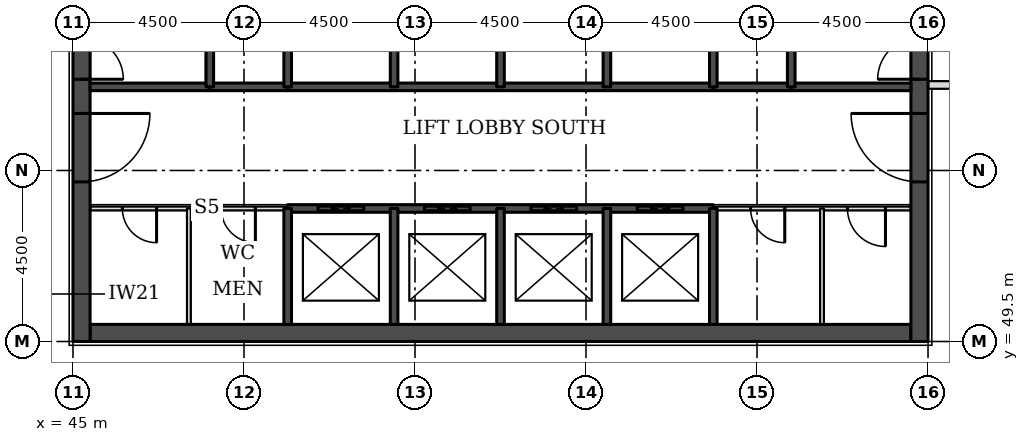
"""IFC4 building model, lengths in metres.
Left out: names, types, materials, properties, quantities, classifications, styles, units other than length and angle.
Written with IfcOpenShell. Run it as: python <this file> out.ifc"""

import sys

from ifc_helpers import new_model, si_unit, direction, frame, frame_2d, origin, place, context, subcontext, project, spatial, rectangle, extrude, element, fill, save


model = new_model("IFC4")
c1 = context("Model", 3, precision=1e-05, world=origin(), true_north=direction((0.0, 1.0)))
c2 = subcontext(c1, "Body", "Model", "MODEL_VIEW")
j1 = project(units=[si_unit("LENGTHUNIT", "METRE"), si_unit("PLANEANGLEUNIT", "RADIAN")], contexts=[c1])
p1 = place(None, origin())
s1 = spatial("IfcSite", under=j1, at=p1, CompositionType="ELEMENT")
p2 = place(p1, origin())
s2 = spatial("IfcBuilding", under=s1, at=p2, CompositionType="ELEMENT")
p3 = place(p2, frame((0.0, 0.0, 138.1)))
s3 = spatial("IfcBuildingStorey", under=s2, at=p3, CompositionType="ELEMENT", Elevation=138.1)
p4 = place(p3, frame((45.45, 49.725, 0.0), z_axis=(0.0, 0.0, 1.0), x_axis=(1.0, 0.0, 0.0)))
e1 = element("IfcWall", 1, at=p4, inside=s3, PredefinedType="SHEAR", context=c2, shape_type="SweptSolid", body=[
    extrude(rectangle(XDim=21.6, YDim=0.45, at=frame_2d((10.8, 0.0))), origin(), (0.0, 0.0, 1.0), 5.0),
])
p5 = place(p3, frame((45.225, 49.5, 0.0), z_axis=(0.0, 0.0, 1.0), x_axis=(0.0, 1.0, 0.0)))
e2 = element("IfcWall", 2, at=p5, inside=s3, PredefinedType="SHEAR", context=c2, shape_type="SweptSolid", body=[
    extrude(rectangle(XDim=22.5, YDim=0.45, at=frame_2d((11.25, 0.0))), origin(), (0.0, 0.0, 1.0), 5.0),
])
p6 = place(p5, frame((4.2, 0.0, 0.0)))
e3 = element("IfcOpeningElement", 3, at=p6, cuts=e2, PredefinedType="OPENING", context=c2, shape_type="SweptSolid", body=[
    extrude(rectangle(XDim=1.8, YDim=2.1, at=frame_2d((0.9, 1.05))), frame((0.0, 0.235, 0.0), z_axis=(0.0, -1.0, 0.0), x_axis=(1.0, 0.0, 0.0)), (0.0, 0.0, 1.0), 0.47),
])
p7 = place(p5, frame((6.9, 0.0, 0.0)))
e4 = element("IfcOpeningElement", 4, at=p7, cuts=e2, PredefinedType="OPENING", context=c2, shape_type="SweptSolid", body=[
    extrude(rectangle(XDim=1.1, YDim=2.1, at=frame_2d((0.55, 1.05))), frame((0.0, 0.235, 0.0), z_axis=(0.0, -1.0, 0.0), x_axis=(1.0, 0.0, 0.0)), (0.0, 0.0, 1.0), 0.47),
])
p8 = place(p5, frame((13.6, 0.0, 0.0)))
e5 = element("IfcOpeningElement", 5, at=p8, cuts=e2, PredefinedType="OPENING", context=c2, shape_type="SweptSolid", body=[
    extrude(rectangle(XDim=1.1, YDim=2.1, at=frame_2d((0.55, 1.05))), frame((0.0, 0.235, 0.0), z_axis=(0.0, -1.0, 0.0), x_axis=(1.0, 0.0, 0.0)), (0.0, 0.0, 1.0), 0.47),
])
p9 = place(p5, frame((16.5, 0.0, 0.0)))
e6 = element("IfcOpeningElement", 6, at=p9, cuts=e2, PredefinedType="OPENING", context=c2, shape_type="SweptSolid", body=[
    extrude(rectangle(XDim=1.8, YDim=2.1, at=frame_2d((0.9, 1.05))), frame((0.0, 0.235, 0.0), z_axis=(0.0, -1.0, 0.0), x_axis=(1.0, 0.0, 0.0)), (0.0, 0.0, 1.0), 0.47),
])
p10 = place(p3, frame((67.275, 49.5, 0.0), z_axis=(0.0, 0.0, 1.0), x_axis=(0.0, 1.0, 0.0)))
e7 = element("IfcWall", 7, at=p10, inside=s3, PredefinedType="SHEAR", context=c2, shape_type="SweptSolid", body=[
    extrude(rectangle(XDim=22.5, YDim=0.45, at=frame_2d((11.25, 0.0))), origin(), (0.0, 0.0, 1.0), 5.0),
])
p11 = place(p10, frame((4.2, 0.0, 0.0)))
e8 = element("IfcOpeningElement", 8, at=p11, cuts=e7, PredefinedType="OPENING", context=c2, shape_type="SweptSolid", body=[
    extrude(rectangle(XDim=1.8, YDim=2.1, at=frame_2d((0.9, 1.05))), frame((0.0, 0.235, 0.0), z_axis=(0.0, -1.0, 0.0), x_axis=(1.0, 0.0, 0.0)), (0.0, 0.0, 1.0), 0.47),
])
p12 = place(p10, frame((6.9, 0.0, 0.0)))
e9 = element("IfcOpeningElement", 9, at=p12, cuts=e7, PredefinedType="OPENING", context=c2, shape_type="SweptSolid", body=[
    extrude(rectangle(XDim=1.1, YDim=2.1, at=frame_2d((0.55, 1.05))), frame((0.0, 0.235, 0.0), z_axis=(0.0, -1.0, 0.0), x_axis=(1.0, 0.0, 0.0)), (0.0, 0.0, 1.0), 0.47),
])
p13 = place(p10, frame((13.6, 0.0, 0.0)))
e10 = element("IfcOpeningElement", 10, at=p13, cuts=e7, PredefinedType="OPENING", context=c2, shape_type="SweptSolid", body=[
    extrude(rectangle(XDim=1.1, YDim=2.1, at=frame_2d((0.55, 1.05))), frame((0.0, 0.235, 0.0), z_axis=(0.0, -1.0, 0.0), x_axis=(1.0, 0.0, 0.0)), (0.0, 0.0, 1.0), 0.47),
])
p14 = place(p10, frame((16.5, 0.0, 0.0)))
e11 = element("IfcOpeningElement", 11, at=p14, cuts=e7, PredefinedType="OPENING", context=c2, shape_type="SweptSolid", body=[
    extrude(rectangle(XDim=1.8, YDim=2.1, at=frame_2d((0.9, 1.05))), frame((0.0, 0.235, 0.0), z_axis=(0.0, -1.0, 0.0), x_axis=(1.0, 0.0, 0.0)), (0.0, 0.0, 1.0), 0.47),
])
p15 = place(p3, frame((67.5, 56.25, 0.0), z_axis=(0.0, 0.0, 1.0), x_axis=(1.0, 0.0, 0.0)))
e12 = element("IfcWall", 12, at=p15, inside=s3, PredefinedType="PARTITIONING", context=c2, shape_type="SweptSolid", body=[
    extrude(rectangle(XDim=2.0, YDim=0.2, at=frame_2d((1.0, 0.0))), origin(), (0.0, 0.0, 1.0), 4.85),
])
p16 = place(p3, frame((45.45, 53.0, 0.0), z_axis=(0.0, 0.0, 1.0), x_axis=(1.0, 0.0, 0.0)))
e13 = element("IfcWall", 13, at=p16, inside=s3, PredefinedType="PARTITIONING", context=c2, shape_type="SweptSolid", body=[
    extrude(rectangle(XDim=5.2, YDim=0.1, at=frame_2d((2.6, 0.0))), origin(), (0.0, 0.0, 1.0), 4.85),
])
p17 = place(p16, frame((0.85, 0.0, 0.0)))
e14 = element("IfcOpeningElement", 14, at=p17, cuts=e13, PredefinedType="OPENING", context=c2, shape_type="SweptSolid", body=[
    extrude(rectangle(XDim=0.9, YDim=2.1, at=frame_2d((0.45, 1.05))), frame((0.0, 0.06, 0.0), z_axis=(0.0, -1.0, 0.0), x_axis=(1.0, 0.0, 0.0)), (0.0, 0.0, 1.0), 0.12),
])
p18 = place(p16, frame((3.45, 0.0, 0.0)))
e15 = element("IfcOpeningElement", 15, at=p18, cuts=e13, PredefinedType="OPENING", context=c2, shape_type="SweptSolid", body=[
    extrude(rectangle(XDim=0.9, YDim=2.1, at=frame_2d((0.45, 1.05))), frame((0.0, 0.06, 0.0), z_axis=(0.0, -1.0, 0.0), x_axis=(1.0, 0.0, 0.0)), (0.0, 0.0, 1.0), 0.12),
])
p19 = place(p3, frame((61.85, 53.0, 0.0), z_axis=(0.0, 0.0, 1.0), x_axis=(1.0, 0.0, 0.0)))
e16 = element("IfcWall", 16, at=p19, inside=s3, PredefinedType="PARTITIONING", context=c2, shape_type="SweptSolid", body=[
    extrude(rectangle(XDim=5.2, YDim=0.1, at=frame_2d((2.6, 0.0))), origin(), (0.0, 0.0, 1.0), 4.85),
])
p20 = place(p19, frame((3.53, 0.0, 0.0)))
e17 = element("IfcOpeningElement", 17, at=p20, cuts=e16, PredefinedType="OPENING", context=c2, shape_type="SweptSolid", body=[
    extrude(rectangle(XDim=1.0, YDim=2.1, at=frame_2d((0.5, 1.05))), frame((0.0, 0.06, 0.0), z_axis=(0.0, -1.0, 0.0), x_axis=(1.0, 0.0, 0.0)), (0.0, 0.0, 1.0), 0.12),
])
p21 = place(p19, frame((0.98, 0.0, 0.0)))
e18 = element("IfcOpeningElement", 18, at=p21, cuts=e16, PredefinedType="OPENING", context=c2, shape_type="SweptSolid", body=[
    extrude(rectangle(XDim=0.9, YDim=2.1, at=frame_2d((0.45, 1.05))), frame((0.0, 0.06, 0.0), z_axis=(0.0, -1.0, 0.0), x_axis=(1.0, 0.0, 0.0)), (0.0, 0.0, 1.0), 0.12),
])
p22 = place(p3, frame((50.65, 53.0, 0.0), z_axis=(0.0, 0.0, 1.0), x_axis=(1.0, 0.0, 0.0)))
e19 = element("IfcWall", 19, at=p22, inside=s3, PredefinedType="SOLIDWALL", context=c2, shape_type="SweptSolid", body=[
    extrude(rectangle(XDim=11.2, YDim=0.2, at=frame_2d((5.6, 0.0))), origin(), (0.0, 0.0, 1.0), 4.85),
])
p23 = place(p22, frame((0.8, 0.0, 0.0)))
e20 = element("IfcOpeningElement", 20, at=p23, cuts=e19, PredefinedType="OPENING", context=c2, shape_type="SweptSolid", body=[
    extrude(rectangle(XDim=1.2, YDim=2.1, at=frame_2d((0.6, 1.05))), frame((0.0, 0.11, 0.0), z_axis=(0.0, -1.0, 0.0), x_axis=(1.0, 0.0, 0.0)), (0.0, 0.0, 1.0), 0.22),
])
p24 = place(p22, frame((3.6, 0.0, 0.0)))
e21 = element("IfcOpeningElement", 21, at=p24, cuts=e19, PredefinedType="OPENING", context=c2, shape_type="SweptSolid", body=[
    extrude(rectangle(XDim=1.2, YDim=2.1, at=frame_2d((0.6, 1.05))), frame((0.0, 0.11, 0.0), z_axis=(0.0, -1.0, 0.0), x_axis=(1.0, 0.0, 0.0)), (0.0, 0.0, 1.0), 0.22),
])
p25 = place(p22, frame((6.4, 0.0, 0.0)))
e22 = element("IfcOpeningElement", 22, at=p25, cuts=e19, PredefinedType="OPENING", context=c2, shape_type="SweptSolid", body=[
    extrude(rectangle(XDim=1.2, YDim=2.1, at=frame_2d((0.6, 1.05))), frame((0.0, 0.11, 0.0), z_axis=(0.0, -1.0, 0.0), x_axis=(1.0, 0.0, 0.0)), (0.0, 0.0, 1.0), 0.22),
])
p26 = place(p22, frame((9.2, 0.0, 0.0)))
e23 = element("IfcOpeningElement", 23, at=p26, cuts=e19, PredefinedType="OPENING", context=c2, shape_type="SweptSolid", body=[
    extrude(rectangle(XDim=1.2, YDim=2.1, at=frame_2d((0.6, 1.05))), frame((0.0, 0.11, 0.0), z_axis=(0.0, -1.0, 0.0), x_axis=(1.0, 0.0, 0.0)), (0.0, 0.0, 1.0), 0.22),
])
for number, where, z_axis, x_axis in (
    (24, (48.6, 56.2, 0.0), (0.0, 0.0, 1.0), (1.0, 0.0, 0.0)),
    (25, (61.85, 56.2, 0.0), (0.0, 0.0, 1.0), (1.0, 0.0, 0.0)),
):
    element("IfcWall", number, at=place(p3, frame(where, z_axis=z_axis, x_axis=x_axis)), inside=s3, PredefinedType="SOLIDWALL", context=c2, shape_type="SweptSolid", body=[
        extrude(rectangle(XDim=2.05, YDim=0.2, at=frame_2d((1.025, 0.0))), origin(), (0.0, 0.0, 1.0), 4.85),
    ])
p27 = place(p3, frame((45.45, 56.2, 0.0), z_axis=(0.0, 0.0, 1.0), x_axis=(1.0, 0.0, 0.0)))
e26 = element("IfcWall", 26, at=p27, inside=s3, PredefinedType="SOLIDWALL", context=c2, shape_type="SweptSolid", body=[
    extrude(rectangle(XDim=3.15, YDim=0.2, at=frame_2d((1.575, 0.0))), origin(), (0.0, 0.0, 1.0), 4.85),
])
p28 = place(p3, frame((50.65, 56.2, 0.0), z_axis=(0.0, 0.0, 1.0), x_axis=(1.0, 0.0, 0.0)))
e27 = element("IfcWall", 27, at=p28, inside=s3, PredefinedType="SOLIDWALL", context=c2, shape_type="SweptSolid", body=[
    extrude(rectangle(XDim=11.2, YDim=0.2, at=frame_2d((5.6, 0.0))), origin(), (0.0, 0.0, 1.0), 4.85),
])
p29 = place(p3, frame((63.9, 56.2, 0.0), z_axis=(0.0, 0.0, 1.0), x_axis=(1.0, 0.0, 0.0)))
e28 = element("IfcWall", 28, at=p29, inside=s3, PredefinedType="SOLIDWALL", context=c2, shape_type="SweptSolid", body=[
    extrude(rectangle(XDim=3.15, YDim=0.2, at=frame_2d((1.575, 0.0))), origin(), (0.0, 0.0, 1.0), 4.85),
])
p30 = place(p3, frame((48.05, 49.95, 0.0), z_axis=(0.0, 0.0, 1.0), x_axis=(0.0, 1.0, 0.0)))
e29 = element("IfcWall", 29, at=p30, inside=s3, PredefinedType="PARTITIONING", context=c2, shape_type="SweptSolid", body=[
    extrude(rectangle(XDim=3.05, YDim=0.1, at=frame_2d((1.525, 0.0))), origin(), (0.0, 0.0, 1.0), 4.85),
])
p31 = place(p3, frame((48.6, 56.2, 0.0), z_axis=(0.0, 0.0, 1.0), x_axis=(0.0, 1.0, 0.0)))
e30 = element("IfcWall", 30, at=p31, inside=s3, PredefinedType="SOLIDWALL", context=c2, shape_type="SweptSolid", body=[
    extrude(rectangle(XDim=5.8, YDim=0.2, at=frame_2d((2.9, 0.0))), origin(), (0.0, 0.0, 1.0), 4.85),
])
p32 = place(p3, frame((50.65, 49.95, 0.0), z_axis=(0.0, 0.0, 1.0), x_axis=(0.0, 1.0, 0.0)))
e31 = element("IfcWall", 31, at=p32, inside=s3, PredefinedType="SOLIDWALL", context=c2, shape_type="SweptSolid", body=[
    extrude(rectangle(XDim=3.05, YDim=0.2, at=frame_2d((1.525, 0.0))), origin(), (0.0, 0.0, 1.0), 4.85),
])
p33 = place(p3, frame((50.65, 56.2, 0.0), z_axis=(0.0, 0.0, 1.0), x_axis=(0.0, 1.0, 0.0)))
e32 = element("IfcWall", 32, at=p33, inside=s3, PredefinedType="SOLIDWALL", context=c2, shape_type="SweptSolid", body=[
    extrude(rectangle(XDim=2.8, YDim=0.2, at=frame_2d((1.4, 0.0))), origin(), (0.0, 0.0, 1.0), 4.85),
])
p34 = place(p3, frame((53.45, 49.95, 0.0), z_axis=(0.0, 0.0, 1.0), x_axis=(0.0, 1.0, 0.0)))
e33 = element("IfcWall", 33, at=p34, inside=s3, PredefinedType="SOLIDWALL", context=c2, shape_type="SweptSolid", body=[
    extrude(rectangle(XDim=3.05, YDim=0.2, at=frame_2d((1.525, 0.0))), origin(), (0.0, 0.0, 1.0), 4.85),
])
p35 = place(p3, frame((53.45, 56.2, 0.0), z_axis=(0.0, 0.0, 1.0), x_axis=(0.0, 1.0, 0.0)))
e34 = element("IfcWall", 34, at=p35, inside=s3, PredefinedType="SOLIDWALL", context=c2, shape_type="SweptSolid", body=[
    extrude(rectangle(XDim=2.8, YDim=0.2, at=frame_2d((1.4, 0.0))), origin(), (0.0, 0.0, 1.0), 4.85),
])
p36 = place(p3, frame((56.25, 49.95, 0.0), z_axis=(0.0, 0.0, 1.0), x_axis=(0.0, 1.0, 0.0)))
e35 = element("IfcWall", 35, at=p36, inside=s3, PredefinedType="SOLIDWALL", context=c2, shape_type="SweptSolid", body=[
    extrude(rectangle(XDim=3.05, YDim=0.2, at=frame_2d((1.525, 0.0))), origin(), (0.0, 0.0, 1.0), 4.85),
])
p37 = place(p3, frame((56.25, 56.2, 0.0), z_axis=(0.0, 0.0, 1.0), x_axis=(0.0, 1.0, 0.0)))
e36 = element("IfcWall", 36, at=p37, inside=s3, PredefinedType="SOLIDWALL", context=c2, shape_type="SweptSolid", body=[
    extrude(rectangle(XDim=2.8, YDim=0.2, at=frame_2d((1.4, 0.0))), origin(), (0.0, 0.0, 1.0), 4.85),
])
p38 = place(p3, frame((59.05, 49.95, 0.0), z_axis=(0.0, 0.0, 1.0), x_axis=(0.0, 1.0, 0.0)))
e37 = element("IfcWall", 37, at=p38, inside=s3, PredefinedType="SOLIDWALL", context=c2, shape_type="SweptSolid", body=[
    extrude(rectangle(XDim=3.05, YDim=0.2, at=frame_2d((1.525, 0.0))), origin(), (0.0, 0.0, 1.0), 4.85),
])
p39 = place(p3, frame((59.05, 56.2, 0.0), z_axis=(0.0, 0.0, 1.0), x_axis=(0.0, 1.0, 0.0)))
e38 = element("IfcWall", 38, at=p39, inside=s3, PredefinedType="SOLIDWALL", context=c2, shape_type="SweptSolid", body=[
    extrude(rectangle(XDim=2.8, YDim=0.2, at=frame_2d((1.4, 0.0))), origin(), (0.0, 0.0, 1.0), 4.85),
])
p40 = place(p3, frame((61.85, 49.95, 0.0), z_axis=(0.0, 0.0, 1.0), x_axis=(0.0, 1.0, 0.0)))
e39 = element("IfcWall", 39, at=p40, inside=s3, PredefinedType="SOLIDWALL", context=c2, shape_type="SweptSolid", body=[
    extrude(rectangle(XDim=3.05, YDim=0.2, at=frame_2d((1.525, 0.0))), origin(), (0.0, 0.0, 1.0), 4.85),
])
p41 = place(p3, frame((61.85, 56.2, 0.0), z_axis=(0.0, 0.0, 1.0), x_axis=(0.0, 1.0, 0.0)))
e40 = element("IfcWall", 40, at=p41, inside=s3, PredefinedType="SOLIDWALL", context=c2, shape_type="SweptSolid", body=[
    extrude(rectangle(XDim=2.8, YDim=0.2, at=frame_2d((1.4, 0.0))), origin(), (0.0, 0.0, 1.0), 4.85),
])
p42 = place(p3, frame((63.9, 56.2, 0.0), z_axis=(0.0, 0.0, 1.0), x_axis=(0.0, 1.0, 0.0)))
e41 = element("IfcWall", 41, at=p42, inside=s3, PredefinedType="SOLIDWALL", context=c2, shape_type="SweptSolid", body=[
    extrude(rectangle(XDim=5.8, YDim=0.2, at=frame_2d((2.9, 0.0))), origin(), (0.0, 0.0, 1.0), 4.85),
])
p43 = place(p3, frame((64.71, 49.95, 0.0), z_axis=(0.0, 0.0, 1.0), x_axis=(0.0, 1.0, 0.0)))
e42 = element("IfcWall", 42, at=p43, inside=s3, PredefinedType="PARTITIONING", context=c2, shape_type="SweptSolid", body=[
    extrude(rectangle(XDim=3.05, YDim=0.1, at=frame_2d((1.525, 0.0))), origin(), (0.0, 0.0, 1.0), 4.85),
])
p44 = place(p23, origin())
e43 = element("IfcDoor", 43, at=p44, inside=s3, OperationType="DOUBLE_DOOR_SLIDING", PredefinedType="DOOR", context=c2, shape_type="SweptSolid", body=[
    extrude(rectangle(XDim=1.2, YDim=2.1, at=frame_2d((0.6, 1.05))), frame((0.0, 0.025, 0.0), z_axis=(0.0, -1.0, 0.0), x_axis=(1.0, 0.0, 0.0)), (0.0, 0.0, 1.0), 0.05),
])
fill(e20, e43)
p45 = place(p24, origin())
e44 = element("IfcDoor", 44, at=p45, inside=s3, OperationType="DOUBLE_DOOR_SLIDING", PredefinedType="DOOR", context=c2, shape_type="SweptSolid", body=[
    extrude(rectangle(XDim=1.2, YDim=2.1, at=frame_2d((0.6, 1.05))), frame((0.0, 0.025, 0.0), z_axis=(0.0, -1.0, 0.0), x_axis=(1.0, 0.0, 0.0)), (0.0, 0.0, 1.0), 0.05),
])
fill(e21, e44)
p46 = place(p25, origin())
e45 = element("IfcDoor", 45, at=p46, inside=s3, OperationType="DOUBLE_DOOR_SLIDING", PredefinedType="DOOR", context=c2, shape_type="SweptSolid", body=[
    extrude(rectangle(XDim=1.2, YDim=2.1, at=frame_2d((0.6, 1.05))), frame((0.0, 0.025, 0.0), z_axis=(0.0, -1.0, 0.0), x_axis=(1.0, 0.0, 0.0)), (0.0, 0.0, 1.0), 0.05),
])
fill(e22, e45)
p47 = place(p26, origin())
e46 = element("IfcDoor", 46, at=p47, inside=s3, OperationType="DOUBLE_DOOR_SLIDING", PredefinedType="DOOR", context=c2, shape_type="SweptSolid", body=[
    extrude(rectangle(XDim=1.2, YDim=2.1, at=frame_2d((0.6, 1.05))), frame((0.0, 0.025, 0.0), z_axis=(0.0, -1.0, 0.0), x_axis=(1.0, 0.0, 0.0)), (0.0, 0.0, 1.0), 0.05),
])
fill(e23, e46)
p48 = place(p6, frame((1.8, 0.0, 0.0), z_axis=(0.0, 0.0, 1.0), x_axis=(-1.0, 0.0, 0.0)))
e47 = element("IfcDoor", 47, at=p48, inside=s3, OperationType="SINGLE_SWING_LEFT", PredefinedType="DOOR", context=c2, shape_type="SweptSolid", body=[
    extrude(rectangle(XDim=1.8, YDim=2.1, at=frame_2d((0.9, 1.05))), frame((0.0, 0.025, 0.0), z_axis=(0.0, -1.0, 0.0), x_axis=(1.0, 0.0, 0.0)), (0.0, 0.0, 1.0), 0.05),
])
fill(e3, e47)
p49 = place(p7, frame((1.1, 0.0, 0.0), z_axis=(0.0, 0.0, 1.0), x_axis=(-1.0, 0.0, 0.0)))
e48 = element("IfcDoor", 48, at=p49, inside=s3, OperationType="SINGLE_SWING_RIGHT", PredefinedType="DOOR", context=c2, shape_type="SweptSolid", body=[
    extrude(rectangle(XDim=1.1, YDim=2.1, at=frame_2d((0.55, 1.05))), frame((0.0, 0.025, 0.0), z_axis=(0.0, -1.0, 0.0), x_axis=(1.0, 0.0, 0.0)), (0.0, 0.0, 1.0), 0.05),
])
fill(e4, e48)
p50 = place(p11, origin())
e49 = element("IfcDoor", 49, at=p50, inside=s3, OperationType="SINGLE_SWING_RIGHT", PredefinedType="DOOR", context=c2, shape_type="SweptSolid", body=[
    extrude(rectangle(XDim=1.8, YDim=2.1, at=frame_2d((0.9, 1.05))), frame((0.0, 0.025, 0.0), z_axis=(0.0, -1.0, 0.0), x_axis=(1.0, 0.0, 0.0)), (0.0, 0.0, 1.0), 0.05),
])
fill(e8, e49)
p51 = place(p12, origin())
e50 = element("IfcDoor", 50, at=p51, inside=s3, OperationType="SINGLE_SWING_LEFT", PredefinedType="DOOR", context=c2, shape_type="SweptSolid", body=[
    extrude(rectangle(XDim=1.1, YDim=2.1, at=frame_2d((0.55, 1.05))), frame((0.0, 0.025, 0.0), z_axis=(0.0, -1.0, 0.0), x_axis=(1.0, 0.0, 0.0)), (0.0, 0.0, 1.0), 0.05),
])
fill(e9, e50)
p52 = place(p20, frame((1.0, 0.0, 0.0), z_axis=(0.0, 0.0, 1.0), x_axis=(-1.0, 0.0, 0.0)))
e51 = element("IfcDoor", 51, at=p52, inside=s3, OperationType="SINGLE_SWING_LEFT", PredefinedType="DOOR", context=c2, shape_type="SweptSolid", body=[
    extrude(rectangle(XDim=1.0, YDim=2.1, at=frame_2d((0.5, 1.05))), frame((0.0, 0.025, 0.0), z_axis=(0.0, -1.0, 0.0), x_axis=(1.0, 0.0, 0.0)), (0.0, 0.0, 1.0), 0.05),
])
fill(e17, e51)
p53 = place(p21, frame((0.9, 0.0, 0.0), z_axis=(0.0, 0.0, 1.0), x_axis=(-1.0, 0.0, 0.0)))
e52 = element("IfcDoor", 52, at=p53, inside=s3, OperationType="SINGLE_SWING_LEFT", PredefinedType="DOOR", context=c2, shape_type="SweptSolid", body=[
    extrude(rectangle(XDim=0.9, YDim=2.1, at=frame_2d((0.45, 1.05))), frame((0.0, 0.025, 0.0), z_axis=(0.0, -1.0, 0.0), x_axis=(1.0, 0.0, 0.0)), (0.0, 0.0, 1.0), 0.05),
])
fill(e18, e52)
p54 = place(p17, frame((0.9, 0.0, 0.0), z_axis=(0.0, 0.0, 1.0), x_axis=(-1.0, 0.0, 0.0)))
e53 = element("IfcDoor", 53, at=p54, inside=s3, OperationType="SINGLE_SWING_LEFT", PredefinedType="DOOR", context=c2, shape_type="SweptSolid", body=[
    extrude(rectangle(XDim=0.9, YDim=2.1, at=frame_2d((0.45, 1.05))), frame((0.0, 0.025, 0.0), z_axis=(0.0, -1.0, 0.0), x_axis=(1.0, 0.0, 0.0)), (0.0, 0.0, 1.0), 0.05),
])
fill(e14, e53)
p55 = place(p18, frame((0.9, 0.0, 0.0), z_axis=(0.0, 0.0, 1.0), x_axis=(-1.0, 0.0, 0.0)))
e54 = element("IfcDoor", 54, at=p55, inside=s3, OperationType="SINGLE_SWING_LEFT", PredefinedType="DOOR", context=c2, shape_type="SweptSolid", body=[
    extrude(rectangle(XDim=0.9, YDim=2.1, at=frame_2d((0.45, 1.05))), frame((0.0, 0.025, 0.0), z_axis=(0.0, -1.0, 0.0), x_axis=(1.0, 0.0, 0.0)), (0.0, 0.0, 1.0), 0.05),
])
fill(e15, e54)
save(model, sys.argv[1])
